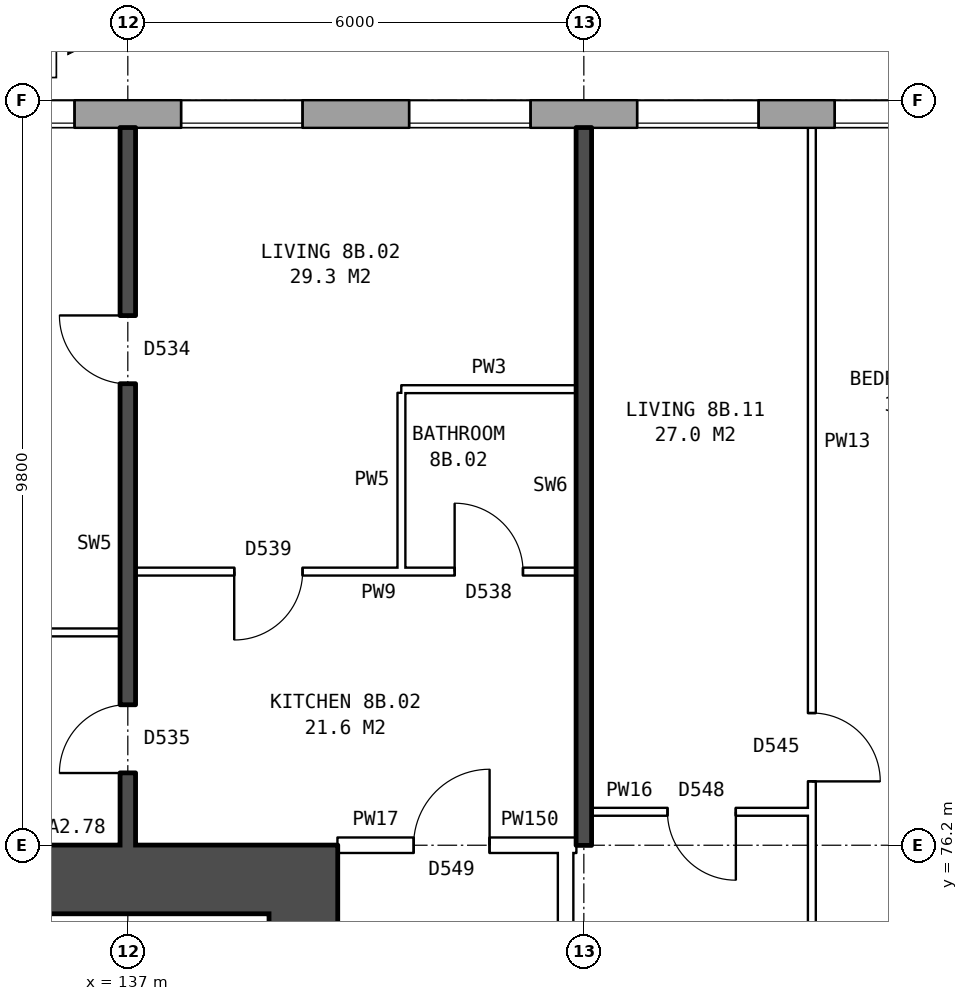
"""IFC4 building model, lengths in metres.
Left out: names, types, materials, properties, quantities, classifications, styles, units other than length and angle.
Written with IfcOpenShell. Run it as: python <this file> out.ifc"""

import sys

from ifc_helpers import new_model, si_unit, direction, frame, frame_2d, origin, place, context, subcontext, project, spatial, rectangle, extrude, element, fill, save


model = new_model("IFC4")
c1 = context("Model", 3, precision=1e-05, world=origin(), true_north=direction((0.0, 1.0)))
c2 = subcontext(c1, "Body", "Model", "MODEL_VIEW")
j1 = project(units=[si_unit("LENGTHUNIT", "METRE"), si_unit("PLANEANGLEUNIT", "RADIAN")], contexts=[c1])
p1 = place(None, origin())
s1 = spatial("IfcSite", under=j1, at=p1, CompositionType="ELEMENT")
p2 = place(p1, origin())
s2 = spatial("IfcBuilding", under=s1, at=p2, CompositionType="ELEMENT")
p3 = place(p2, frame((0.0, 0.0, 31.9)))
s3 = spatial("IfcBuildingStorey", under=s2, at=p3, CompositionType="ELEMENT", Elevation=31.9)
p4 = place(p3, frame((174.675, 85.82, 0.0), z_axis=(0.0, 0.0, 1.0), x_axis=(-1.0, 0.0, 0.0)))
e1 = element("IfcWall", 1, at=p4, inside=s3, PredefinedType="STANDARD", context=c2, shape_type="SweptSolid", body=[
    extrude(rectangle(XDim=40.601, YDim=0.36, at=frame_2d((20.3, 0.0))), origin(), (0.0, 0.0, 1.0), 2.85),
])
p5 = place(p4, frame((2.375, 0.0, 0.8)))
e2 = element("IfcOpeningElement", 2, at=p5, cuts=e1, PredefinedType="OPENING", context=c2, shape_type="SweptSolid", body=[
    extrude(rectangle(XDim=1.6, YDim=1.8, at=frame_2d((0.8, 0.9))), frame((0.0, 0.19, 0.0), z_axis=(0.0, -1.0, 0.0), x_axis=(1.0, 0.0, 0.0)), (0.0, 0.0, 1.0), 0.38),
])
p6 = place(p4, frame((5.375, 0.0, 0.8)))
e3 = element("IfcOpeningElement", 3, at=p6, cuts=e1, PredefinedType="OPENING", context=c2, shape_type="SweptSolid", body=[
    extrude(rectangle(XDim=1.6, YDim=1.8, at=frame_2d((0.8, 0.9))), frame((0.0, 0.19, 0.0), z_axis=(0.0, -1.0, 0.0), x_axis=(1.0, 0.0, 0.0)), (0.0, 0.0, 1.0), 0.38),
])
p7 = place(p4, frame((8.375, 0.0, 0.8)))
e4 = element("IfcOpeningElement", 4, at=p7, cuts=e1, PredefinedType="OPENING", context=c2, shape_type="SweptSolid", body=[
    extrude(rectangle(XDim=1.6, YDim=1.8, at=frame_2d((0.8, 0.9))), frame((0.0, 0.19, 0.0), z_axis=(0.0, -1.0, 0.0), x_axis=(1.0, 0.0, 0.0)), (0.0, 0.0, 1.0), 0.38),
])
p8 = place(p4, frame((11.375, 0.0, 0.8)))
e5 = element("IfcOpeningElement", 5, at=p8, cuts=e1, PredefinedType="OPENING", context=c2, shape_type="SweptSolid", body=[
    extrude(rectangle(XDim=1.6, YDim=1.8, at=frame_2d((0.8, 0.9))), frame((0.0, 0.19, 0.0), z_axis=(0.0, -1.0, 0.0), x_axis=(1.0, 0.0, 0.0)), (0.0, 0.0, 1.0), 0.38),
])
p9 = place(p4, frame((13.875, 0.0, 1.7)))
e6 = element("IfcOpeningElement", 6, at=p9, cuts=e1, PredefinedType="OPENING", context=c2, shape_type="SweptSolid", body=[
    extrude(rectangle(XDim=0.6, YDim=0.9, at=frame_2d((0.3, 0.45))), frame((0.0, 0.19, 0.0), z_axis=(0.0, -1.0, 0.0), x_axis=(1.0, 0.0, 0.0)), (0.0, 0.0, 1.0), 0.38),
])
p10 = place(p4, frame((17.375, 0.0, 0.8)))
e7 = element("IfcOpeningElement", 7, at=p10, cuts=e1, PredefinedType="OPENING", context=c2, shape_type="SweptSolid", body=[
    extrude(rectangle(XDim=1.6, YDim=1.8, at=frame_2d((0.8, 0.9))), frame((0.0, 0.19, 0.0), z_axis=(0.0, -1.0, 0.0), x_axis=(1.0, 0.0, 0.0)), (0.0, 0.0, 1.0), 0.38),
])
p11 = place(p4, frame((20.375, 0.0, 0.8)))
e8 = element("IfcOpeningElement", 8, at=p11, cuts=e1, PredefinedType="OPENING", context=c2, shape_type="SweptSolid", body=[
    extrude(rectangle(XDim=1.6, YDim=1.8, at=frame_2d((0.8, 0.9))), frame((0.0, 0.19, 0.0), z_axis=(0.0, -1.0, 0.0), x_axis=(1.0, 0.0, 0.0)), (0.0, 0.0, 1.0), 0.38),
])
p12 = place(p4, frame((22.825, 0.0, 0.55)))
e9 = element("IfcOpeningElement", 9, at=p12, cuts=e1, PredefinedType="OPENING", context=c2, shape_type="SweptSolid", body=[
    extrude(rectangle(XDim=1.2, YDim=1.8, at=frame_2d((0.6, 0.9))), frame((0.0, 0.19, 0.0), z_axis=(0.0, -1.0, 0.0), x_axis=(1.0, 0.0, 0.0)), (0.0, 0.0, 1.0), 0.38),
])
p13 = place(p4, frame((26.075, 0.0, 1.7)))
e10 = element("IfcOpeningElement", 10, at=p13, cuts=e1, PredefinedType="OPENING", context=c2, shape_type="SweptSolid", body=[
    extrude(rectangle(XDim=0.8, YDim=0.9, at=frame_2d((0.4, 0.45))), frame((0.0, 0.19, 0.0), z_axis=(0.0, -1.0, 0.0), x_axis=(1.0, 0.0, 0.0)), (0.0, 0.0, 1.0), 0.38),
])
p14 = place(p4, frame((29.375, 0.0, 0.8)))
e11 = element("IfcOpeningElement", 11, at=p14, cuts=e1, PredefinedType="OPENING", context=c2, shape_type="SweptSolid", body=[
    extrude(rectangle(XDim=1.6, YDim=1.8, at=frame_2d((0.8, 0.9))), frame((0.0, 0.19, 0.0), z_axis=(0.0, -1.0, 0.0), x_axis=(1.0, 0.0, 0.0)), (0.0, 0.0, 1.0), 0.38),
])
p15 = place(p4, frame((32.375, 0.0, 0.8)))
e12 = element("IfcOpeningElement", 12, at=p15, cuts=e1, PredefinedType="OPENING", context=c2, shape_type="SweptSolid", body=[
    extrude(rectangle(XDim=1.6, YDim=1.8, at=frame_2d((0.8, 0.9))), frame((0.0, 0.19, 0.0), z_axis=(0.0, -1.0, 0.0), x_axis=(1.0, 0.0, 0.0)), (0.0, 0.0, 1.0), 0.38),
])
p16 = place(p4, frame((35.375, 0.0, 0.8)))
e13 = element("IfcOpeningElement", 13, at=p16, cuts=e1, PredefinedType="OPENING", context=c2, shape_type="SweptSolid", body=[
    extrude(rectangle(XDim=1.6, YDim=1.8, at=frame_2d((0.8, 0.9))), frame((0.0, 0.19, 0.0), z_axis=(0.0, -1.0, 0.0), x_axis=(1.0, 0.0, 0.0)), (0.0, 0.0, 1.0), 0.38),
])
p17 = place(p4, frame((38.375, 0.0, 0.8)))
e14 = element("IfcOpeningElement", 14, at=p17, cuts=e1, PredefinedType="OPENING", context=c2, shape_type="SweptSolid", body=[
    extrude(rectangle(XDim=1.6, YDim=1.8, at=frame_2d((0.8, 0.9))), frame((0.0, 0.19, 0.0), z_axis=(0.0, -1.0, 0.0), x_axis=(1.0, 0.0, 0.0)), (0.0, 0.0, 1.0), 0.38),
])
p18 = place(p4, frame((15.775, 0.0, 0.8)))
e15 = element("IfcOpeningElement", 15, at=p18, cuts=e1, PredefinedType="OPENING", context=c2, shape_type="SweptSolid", body=[
    extrude(rectangle(XDim=1.2, YDim=0.9, at=frame_2d((0.6, 0.45))), frame((0.0, 0.19, 0.0), z_axis=(0.0, -1.0, 0.0), x_axis=(1.0, 0.0, 0.0)), (0.0, 0.0, 1.0), 0.38),
])
p19 = place(p4, frame((24.325, 0.0, 0.55)))
e16 = element("IfcOpeningElement", 16, at=p19, cuts=e1, PredefinedType="OPENING", context=c2, shape_type="SweptSolid", body=[
    extrude(rectangle(XDim=0.8, YDim=0.9, at=frame_2d((0.4, 0.45))), frame((0.0, 0.19, 0.0), z_axis=(0.0, -1.0, 0.0), x_axis=(1.0, 0.0, 0.0)), (0.0, 0.0, 1.0), 0.38),
])
p20 = place(p4, frame((27.175, 0.0, 0.8)))
e17 = element("IfcOpeningElement", 17, at=p20, cuts=e1, PredefinedType="OPENING", context=c2, shape_type="SweptSolid", body=[
    extrude(rectangle(XDim=1.2, YDim=1.8, at=frame_2d((0.6, 0.9))), frame((0.0, 0.19, 0.0), z_axis=(0.0, -1.0, 0.0), x_axis=(1.0, 0.0, 0.0)), (0.0, 0.0, 1.0), 0.38),
])
p21 = place(p3, frame((139.31, 64.7, 0.0), z_axis=(0.0, 0.0, 1.0), x_axis=(0.0, 1.0, 0.0)))
e18 = element("IfcWall", 18, at=p21, inside=s3, PredefinedType="SHEAR", context=c2, shape_type="SweptSolid", body=[
    extrude(rectangle(XDim=10.6, YDim=0.9, at=frame_2d((5.3, 0.0))), origin(), (0.0, 0.0, 1.0), 2.85),
])
p22 = place(p21, frame((0.425, 0.0, 0.0)))
e19 = element("IfcOpeningElement", 19, at=p22, cuts=e18, PredefinedType="OPENING", context=c2, shape_type="SweptSolid", body=[
    extrude(rectangle(XDim=1.1, YDim=2.1, at=frame_2d((0.55, 1.05))), frame((0.0, 0.46, 0.0), z_axis=(0.0, -1.0, 0.0), x_axis=(1.0, 0.0, 0.0)), (0.0, 0.0, 1.0), 0.92),
])
p23 = place(p21, frame((9.0, 0.0, 0.0)))
e20 = element("IfcOpeningElement", 20, at=p23, cuts=e18, PredefinedType="OPENING", context=c2, shape_type="SweptSolid", body=[
    extrude(rectangle(XDim=1.1, YDim=2.1, at=frame_2d((0.55, 1.05))), frame((0.0, 0.46, 0.0), z_axis=(0.0, -1.0, 0.0), x_axis=(1.0, 0.0, 0.0)), (0.0, 0.0, 1.0), 0.92),
])
p24 = place(p21, frame((7.225, 0.0, 0.0)))
e21 = element("IfcOpeningElement", 21, at=p24, cuts=e18, PredefinedType="OPENING", context=c2, shape_type="SweptSolid", body=[
    extrude(rectangle(XDim=0.85, YDim=2.1, at=frame_2d((0.425, 1.05))), frame((0.0, 0.46, 0.0), z_axis=(0.0, -1.0, 0.0), x_axis=(1.0, 0.0, 0.0)), (0.0, 0.0, 1.0), 0.92),
])
p25 = place(p3, frame((139.76, 75.75, 0.0), z_axis=(0.0, 0.0, 1.0), x_axis=(-1.0, 0.0, 0.0)))
e22 = element("IfcWall", 22, at=p25, inside=s3, PredefinedType="SHEAR", context=c2, shape_type="SweptSolid", body=[
    extrude(rectangle(XDim=8.4, YDim=0.9, at=frame_2d((4.2, 0.0))), origin(), (0.0, 0.0, 1.0), 2.85),
])
p26 = place(p3, frame((142.76, 63.9, 0.0), z_axis=(0.0, 0.0, 1.0), x_axis=(0.0, 1.0, 0.0)))
e23 = element("IfcWall", 23, at=p26, inside=s3, PredefinedType="PARTITIONING", context=c2, shape_type="SweptSolid", body=[
    extrude(rectangle(XDim=12.2, YDim=0.2, at=frame_2d((6.1, 0.0))), origin(), (0.0, 0.0, 1.0), 2.85),
])
p27 = place(p26, frame((5.1, 0.0, 0.0)))
e24 = element("IfcOpeningElement", 24, at=p27, cuts=e23, PredefinedType="OPENING", context=c2, shape_type="SweptSolid", body=[
    extrude(rectangle(XDim=2.0, YDim=2.1, at=frame_2d((1.0, 1.05))), frame((0.0, 0.11, 0.0), z_axis=(0.0, -1.0, 0.0), x_axis=(1.0, 0.0, 0.0)), (0.0, 0.0, 1.0), 0.22),
])
p28 = place(p3, frame((139.76, 76.2, 0.0), z_axis=(0.0, 0.0, 1.0), x_axis=(1.0, 0.0, 0.0)))
e25 = element("IfcWall", 25, at=p28, inside=s3, PredefinedType="PARTITIONING", context=c2, shape_type="SweptSolid", body=[
    extrude(rectangle(XDim=3.0, YDim=0.2, at=frame_2d((1.5, 0.0))), origin(), (0.0, 0.0, 1.0), 2.85),
])
p29 = place(p28, frame((1.0, 0.0, 0.0)))
e26 = element("IfcOpeningElement", 26, at=p29, cuts=e25, PredefinedType="OPENING", context=c2, shape_type="SweptSolid", body=[
    extrude(rectangle(XDim=1.0, YDim=2.1, at=frame_2d((0.5, 1.05))), frame((0.0, 0.11, 0.0), z_axis=(0.0, -1.0, 0.0), x_axis=(1.0, 0.0, 0.0)), (0.0, 0.0, 1.0), 0.22),
])
p30 = place(p3, frame((142.76, 76.2, 0.0), z_axis=(0.0, 0.0, 1.0), x_axis=(1.0, 0.0, 0.0)))
e27 = element("IfcWall", 27, at=p30, inside=s3, PredefinedType="PARTITIONING", context=c2, shape_type="SweptSolid", body=[
    extrude(rectangle(XDim=0.14, YDim=0.2, at=frame_2d((0.07, 0.0))), origin(), (0.0, 0.0, 1.0), 2.85),
])
p31 = place(p3, frame((143.1, 76.64, 0.0), z_axis=(0.0, 0.0, 1.0), x_axis=(1.0, 0.0, 0.0)))
e28 = element("IfcWall", 28, at=p31, inside=s3, PredefinedType="PARTITIONING", context=c2, shape_type="SweptSolid", body=[
    extrude(rectangle(XDim=2.9, YDim=0.1, at=frame_2d((1.45, 0.0))), origin(), (0.0, 0.0, 1.0), 2.85),
])
p32 = place(p31, frame((1.0, 0.0, 0.0)))
e29 = element("IfcOpeningElement", 29, at=p32, cuts=e28, PredefinedType="OPENING", context=c2, shape_type="SweptSolid", body=[
    extrude(rectangle(XDim=0.9, YDim=2.1, at=frame_2d((0.45, 1.05))), frame((0.0, 0.06, 0.0), z_axis=(0.0, -1.0, 0.0), x_axis=(1.0, 0.0, 0.0)), (0.0, 0.0, 1.0), 0.12),
])
p33 = place(p3, frame((131.36, 79.0, 0.0), z_axis=(0.0, 0.0, 1.0), x_axis=(1.0, 0.0, 0.0)))
e30 = element("IfcWall", 30, at=p33, inside=s3, PredefinedType="PARTITIONING", context=c2, shape_type="SweptSolid", body=[
    extrude(rectangle(XDim=5.54, YDim=0.1, at=frame_2d((2.77, 0.0))), origin(), (0.0, 0.0, 1.0), 2.85),
])
p34 = place(p3, frame((137.1, 79.8, 0.0), z_axis=(0.0, 0.0, 1.0), x_axis=(1.0, 0.0, 0.0)))
e31 = element("IfcWall", 31, at=p34, inside=s3, PredefinedType="PARTITIONING", context=c2, shape_type="SweptSolid", body=[
    extrude(rectangle(XDim=5.8, YDim=0.1, at=frame_2d((2.9, 0.0))), origin(), (0.0, 0.0, 1.0), 2.85),
])
p35 = place(p34, frame((1.3, 0.0, 0.0)))
e32 = element("IfcOpeningElement", 32, at=p35, cuts=e31, PredefinedType="OPENING", context=c2, shape_type="SweptSolid", body=[
    extrude(rectangle(XDim=0.9, YDim=2.1, at=frame_2d((0.45, 1.05))), frame((0.0, 0.06, 0.0), z_axis=(0.0, -1.0, 0.0), x_axis=(1.0, 0.0, 0.0)), (0.0, 0.0, 1.0), 0.12),
])
p36 = place(p34, frame((4.2, 0.0, 0.0)))
e33 = element("IfcOpeningElement", 33, at=p36, cuts=e31, PredefinedType="OPENING", context=c2, shape_type="SweptSolid", body=[
    extrude(rectangle(XDim=0.9, YDim=2.1, at=frame_2d((0.45, 1.05))), frame((0.0, 0.06, 0.0), z_axis=(0.0, -1.0, 0.0), x_axis=(1.0, 0.0, 0.0)), (0.0, 0.0, 1.0), 0.12),
])
p37 = place(p3, frame((140.6, 82.2, 0.0), z_axis=(0.0, 0.0, 1.0), x_axis=(1.0, 0.0, 0.0)))
e34 = element("IfcWall", 34, at=p37, inside=s3, PredefinedType="PARTITIONING", context=c2, shape_type="SweptSolid", body=[
    extrude(rectangle(XDim=2.3, YDim=0.1, at=frame_2d((1.15, 0.0))), origin(), (0.0, 0.0, 1.0), 2.85),
])
p38 = place(p3, frame((137.0, 76.2, 0.0), z_axis=(0.0, 0.0, 1.0), x_axis=(0.0, 1.0, 0.0)))
e35 = element("IfcWall", 35, at=p38, inside=s3, PredefinedType="SOLIDWALL", context=c2, shape_type="SweptSolid", body=[
    extrude(rectangle(XDim=9.44, YDim=0.2, at=frame_2d((4.72, 0.0))), origin(), (0.0, 0.0, 1.0), 2.85),
])
p39 = place(p38, frame((6.07, 0.0, 0.0)))
e36 = element("IfcOpeningElement", 36, at=p39, cuts=e35, PredefinedType="OPENING", context=c2, shape_type="SweptSolid", body=[
    extrude(rectangle(XDim=0.9, YDim=2.1, at=frame_2d((0.45, 1.05))), frame((0.0, 0.11, 0.0), z_axis=(0.0, -1.0, 0.0), x_axis=(1.0, 0.0, 0.0)), (0.0, 0.0, 1.0), 0.22),
])
p40 = place(p38, frame((0.95, 0.0, 0.0)))
e37 = element("IfcOpeningElement", 37, at=p40, cuts=e35, PredefinedType="OPENING", context=c2, shape_type="SweptSolid", body=[
    extrude(rectangle(XDim=0.9, YDim=2.1, at=frame_2d((0.45, 1.05))), frame((0.0, 0.11, 0.0), z_axis=(0.0, -1.0, 0.0), x_axis=(1.0, 0.0, 0.0)), (0.0, 0.0, 1.0), 0.22),
])
p41 = place(p3, frame((140.6, 79.85, 0.0), z_axis=(0.0, 0.0, 1.0), x_axis=(0.0, 1.0, 0.0)))
e38 = element("IfcWall", 38, at=p41, inside=s3, PredefinedType="PARTITIONING", context=c2, shape_type="SweptSolid", body=[
    extrude(rectangle(XDim=2.3, YDim=0.1, at=frame_2d((1.15, 0.0))), origin(), (0.0, 0.0, 1.0), 2.85),
])
p42 = place(p3, frame((143.0, 76.2, 0.0), z_axis=(0.0, 0.0, 1.0), x_axis=(0.0, 1.0, 0.0)))
e39 = element("IfcWall", 39, at=p42, inside=s3, PredefinedType="SOLIDWALL", context=c2, shape_type="SweptSolid", body=[
    extrude(rectangle(XDim=9.44, YDim=0.2, at=frame_2d((4.72, 0.0))), origin(), (0.0, 0.0, 1.0), 2.85),
])
p43 = place(p3, frame((146.0, 71.3, 0.0), z_axis=(0.0, 0.0, 1.0), x_axis=(0.0, 1.0, 0.0)))
e40 = element("IfcWall", 40, at=p43, inside=s3, PredefinedType="PARTITIONING", context=c2, shape_type="SweptSolid", body=[
    extrude(rectangle(XDim=14.34, YDim=0.1, at=frame_2d((7.17, 0.0))), origin(), (0.0, 0.0, 1.0), 2.85),
])
p44 = place(p43, frame((5.74, 0.0, 0.0)))
e41 = element("IfcOpeningElement", 41, at=p44, cuts=e40, PredefinedType="OPENING", context=c2, shape_type="SweptSolid", body=[
    extrude(rectangle(XDim=0.9, YDim=2.1, at=frame_2d((0.45, 1.05))), frame((0.0, 0.06, 0.0), z_axis=(0.0, -1.0, 0.0), x_axis=(1.0, 0.0, 0.0)), (0.0, 0.0, 1.0), 0.12),
])
p45 = place(p43, frame((0.4, 0.0, 0.0)))
e42 = element("IfcOpeningElement", 42, at=p45, cuts=e40, PredefinedType="OPENING", context=c2, shape_type="SweptSolid", body=[
    extrude(rectangle(XDim=0.9, YDim=2.1, at=frame_2d((0.45, 1.05))), frame((0.0, 0.06, 0.0), z_axis=(0.0, -1.0, 0.0), x_axis=(1.0, 0.0, 0.0)), (0.0, 0.0, 1.0), 0.12),
])
p46 = place(p14, origin())
e43 = element("IfcWindow", 43, at=p46, inside=s3, PartitioningType="SINGLE_PANEL", PredefinedType="WINDOW", context=c2, shape_type="SweptSolid", body=[
    extrude(rectangle(XDim=1.6, YDim=1.8, at=frame_2d((0.8, 0.9))), frame((0.0, 0.15, 0.0), z_axis=(0.0, -1.0, 0.0), x_axis=(1.0, 0.0, 0.0)), (0.0, 0.0, 1.0), 0.06),
])
fill(e11, e43)
p47 = place(p15, origin())
e44 = element("IfcWindow", 44, at=p47, inside=s3, PartitioningType="SINGLE_PANEL", PredefinedType="WINDOW", context=c2, shape_type="SweptSolid", body=[
    extrude(rectangle(XDim=1.6, YDim=1.8, at=frame_2d((0.8, 0.9))), frame((0.0, 0.15, 0.0), z_axis=(0.0, -1.0, 0.0), x_axis=(1.0, 0.0, 0.0)), (0.0, 0.0, 1.0), 0.06),
])
fill(e12, e44)
p48 = place(p16, origin())
e45 = element("IfcWindow", 45, at=p48, inside=s3, PartitioningType="SINGLE_PANEL", PredefinedType="WINDOW", context=c2, shape_type="SweptSolid", body=[
    extrude(rectangle(XDim=1.6, YDim=1.8, at=frame_2d((0.8, 0.9))), frame((0.0, 0.15, 0.0), z_axis=(0.0, -1.0, 0.0), x_axis=(1.0, 0.0, 0.0)), (0.0, 0.0, 1.0), 0.06),
])
fill(e13, e45)
p49 = place(p17, origin())
e46 = element("IfcWindow", 46, at=p49, inside=s3, PartitioningType="SINGLE_PANEL", PredefinedType="WINDOW", context=c2, shape_type="SweptSolid", body=[
    extrude(rectangle(XDim=1.6, YDim=1.8, at=frame_2d((0.8, 0.9))), frame((0.0, 0.15, 0.0), z_axis=(0.0, -1.0, 0.0), x_axis=(1.0, 0.0, 0.0)), (0.0, 0.0, 1.0), 0.06),
])
fill(e14, e46)
p50 = place(p39, origin())
e47 = element("IfcDoor", 47, at=p50, inside=s3, OperationType="SINGLE_SWING_RIGHT", PredefinedType="DOOR", context=c2, shape_type="SweptSolid", body=[
    extrude(rectangle(XDim=0.9, YDim=2.1, at=frame_2d((0.45, 1.05))), frame((0.0, 0.025, 0.0), z_axis=(0.0, -1.0, 0.0), x_axis=(1.0, 0.0, 0.0)), (0.0, 0.0, 1.0), 0.05),
])
fill(e36, e47)
p51 = place(p40, origin())
e48 = element("IfcDoor", 48, at=p51, inside=s3, OperationType="SINGLE_SWING_LEFT", PredefinedType="DOOR", context=c2, shape_type="SweptSolid", body=[
    extrude(rectangle(XDim=0.9, YDim=2.1, at=frame_2d((0.45, 1.05))), frame((0.0, 0.025, 0.0), z_axis=(0.0, -1.0, 0.0), x_axis=(1.0, 0.0, 0.0)), (0.0, 0.0, 1.0), 0.05),
])
fill(e37, e48)
p52 = place(p29, origin())
e49 = element("IfcDoor", 49, at=p52, inside=s3, OperationType="SINGLE_SWING_RIGHT", PredefinedType="DOOR", context=c2, shape_type="SweptSolid", body=[
    extrude(rectangle(XDim=1.0, YDim=2.1, at=frame_2d((0.5, 1.05))), frame((0.0, 0.025, 0.0), z_axis=(0.0, -1.0, 0.0), x_axis=(1.0, 0.0, 0.0)), (0.0, 0.0, 1.0), 0.05),
])
fill(e26, e49)
p53 = place(p35, frame((0.9, 0.0, 0.0), z_axis=(0.0, 0.0, 1.0), x_axis=(-1.0, 0.0, 0.0)))
e50 = element("IfcDoor", 50, at=p53, inside=s3, OperationType="SINGLE_SWING_RIGHT", PredefinedType="DOOR", context=c2, shape_type="SweptSolid", body=[
    extrude(rectangle(XDim=0.9, YDim=2.1, at=frame_2d((0.45, 1.05))), frame((0.0, 0.025, 0.0), z_axis=(0.0, -1.0, 0.0), x_axis=(1.0, 0.0, 0.0)), (0.0, 0.0, 1.0), 0.05),
])
fill(e32, e50)
p54 = place(p36, origin())
e51 = element("IfcDoor", 51, at=p54, inside=s3, OperationType="SINGLE_SWING_LEFT", PredefinedType="DOOR", context=c2, shape_type="SweptSolid", body=[
    extrude(rectangle(XDim=0.9, YDim=2.1, at=frame_2d((0.45, 1.05))), frame((0.0, 0.025, 0.0), z_axis=(0.0, -1.0, 0.0), x_axis=(1.0, 0.0, 0.0)), (0.0, 0.0, 1.0), 0.05),
])
fill(e33, e51)
p55 = place(p44, frame((0.9, 0.0, 0.0), z_axis=(0.0, 0.0, 1.0), x_axis=(-1.0, 0.0, 0.0)))
e52 = element("IfcDoor", 52, at=p55, inside=s3, OperationType="SINGLE_SWING_RIGHT", PredefinedType="DOOR", context=c2, shape_type="SweptSolid", body=[
    extrude(rectangle(XDim=0.9, YDim=2.1, at=frame_2d((0.45, 1.05))), frame((0.0, 0.025, 0.0), z_axis=(0.0, -1.0, 0.0), x_axis=(1.0, 0.0, 0.0)), (0.0, 0.0, 1.0), 0.05),
])
fill(e41, e52)
p56 = place(p32, frame((0.9, 0.0, 0.0), z_axis=(0.0, 0.0, 1.0), x_axis=(-1.0, 0.0, 0.0)))
e53 = element("IfcDoor", 53, at=p56, inside=s3, OperationType="SINGLE_SWING_LEFT", PredefinedType="DOOR", context=c2, shape_type="SweptSolid", body=[
    extrude(rectangle(XDim=0.9, YDim=2.1, at=frame_2d((0.45, 1.05))), frame((0.0, 0.025, 0.0), z_axis=(0.0, -1.0, 0.0), x_axis=(1.0, 0.0, 0.0)), (0.0, 0.0, 1.0), 0.05),
])
fill(e29, e53)
p57 = place(p20, origin())
e54 = element("IfcWindow", 54, at=p57, inside=s3, PartitioningType="SINGLE_PANEL", PredefinedType="WINDOW", context=c2, shape_type="SweptSolid", body=[
    extrude(rectangle(XDim=1.2, YDim=1.8, at=frame_2d((0.6, 0.9))), frame((0.0, 0.15, 0.0), z_axis=(0.0, -1.0, 0.0), x_axis=(1.0, 0.0, 0.0)), (0.0, 0.0, 1.0), 0.06),
])
fill(e17, e54)
save(model, sys.argv[1])
